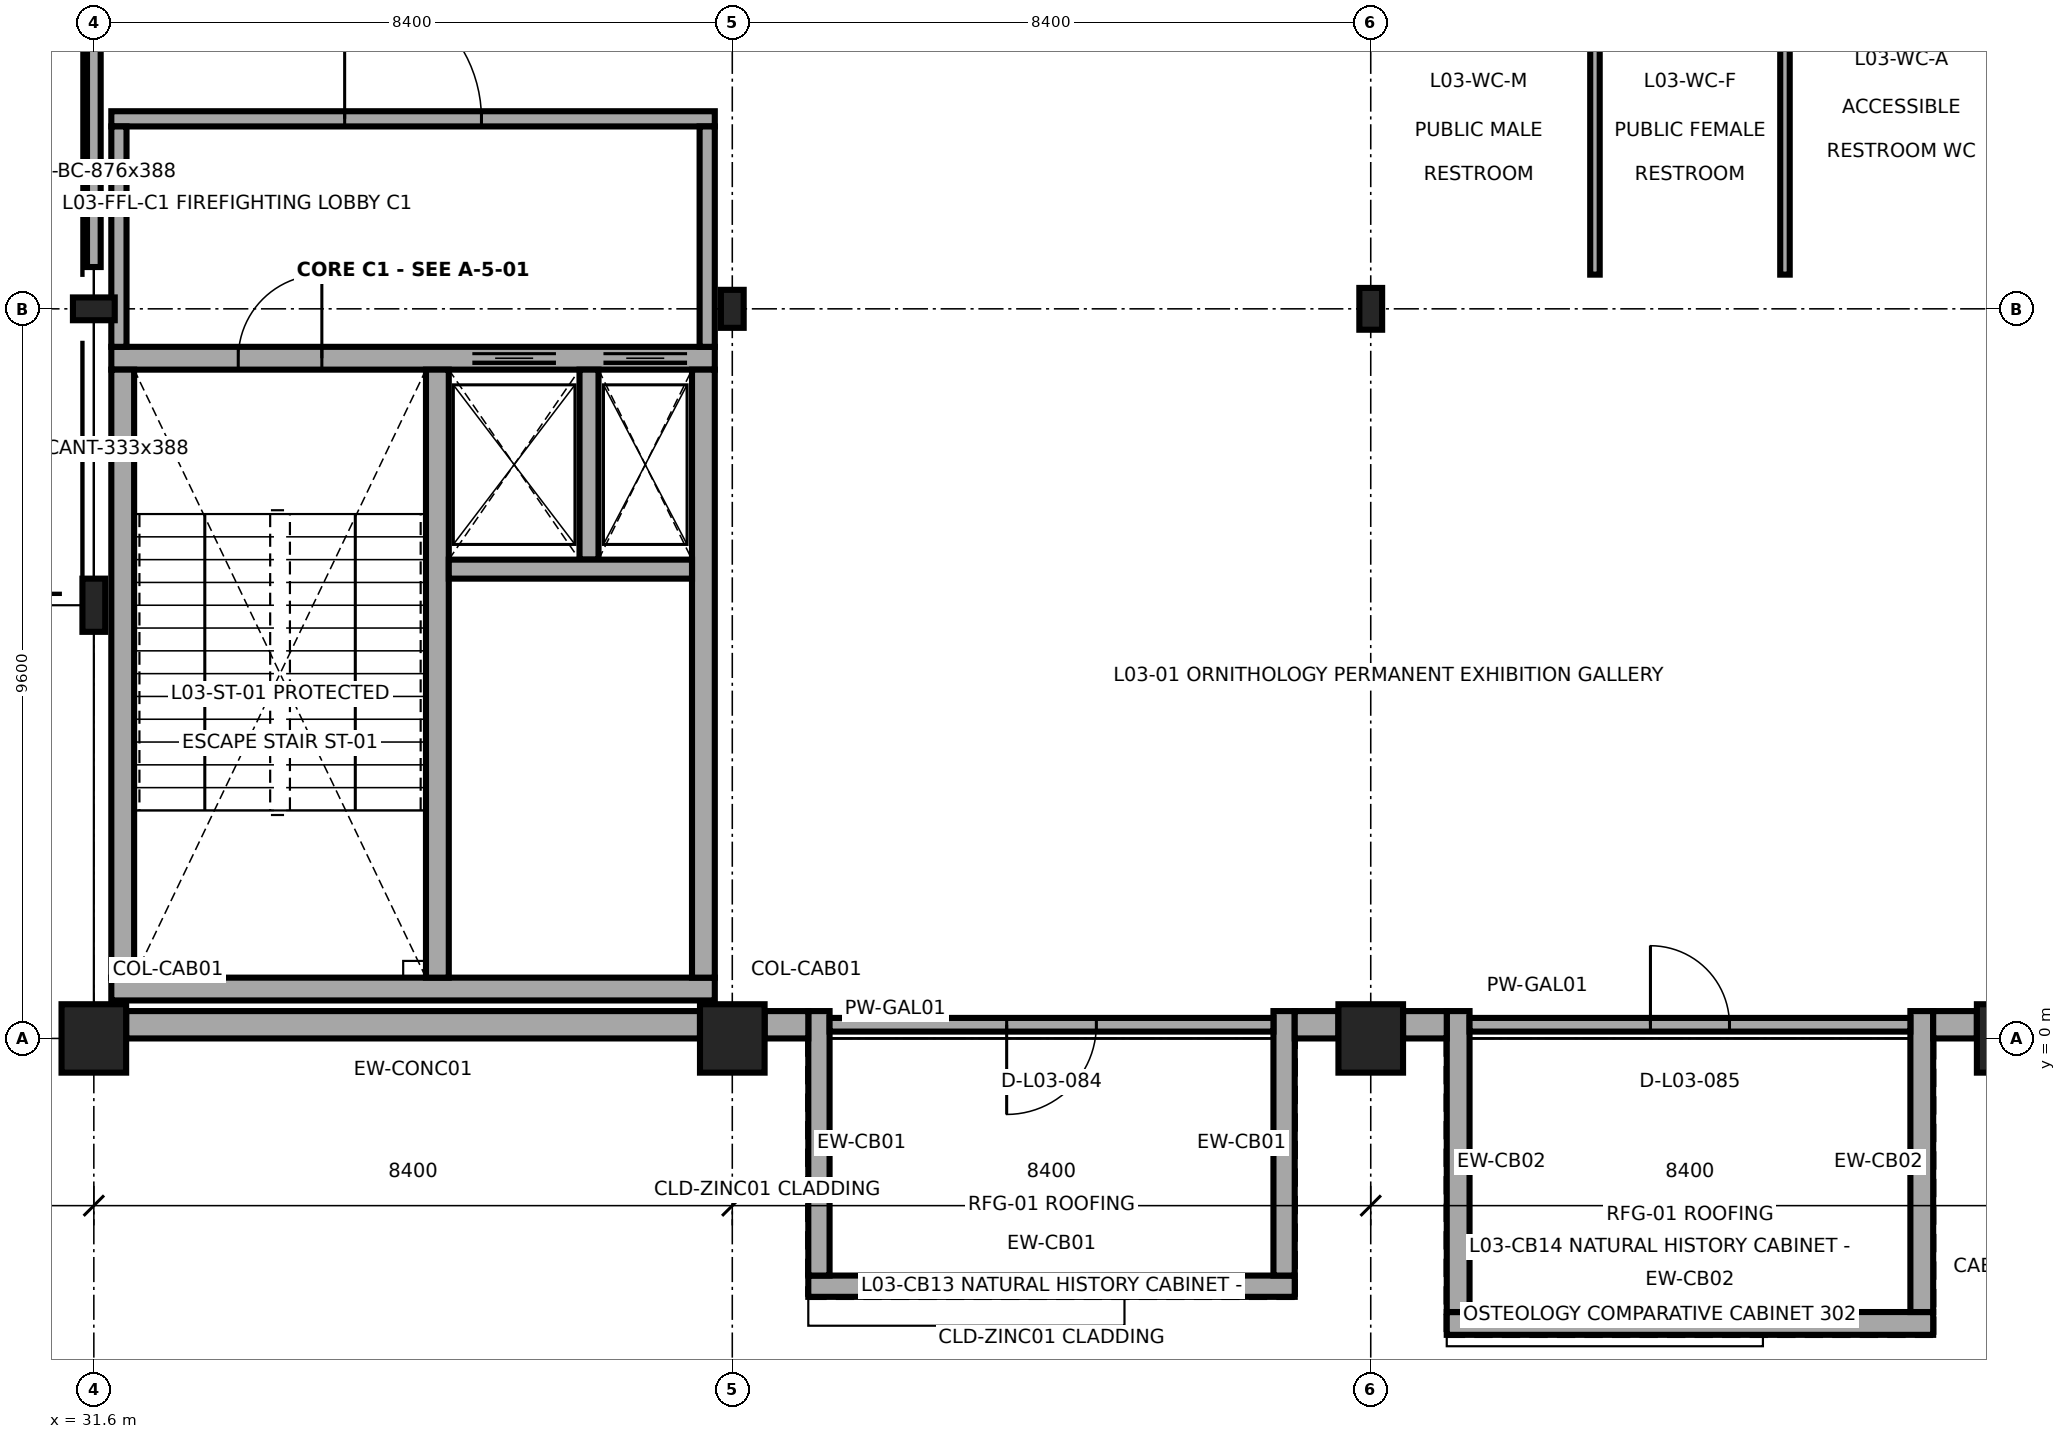
"""IFC4 building model, lengths in metres.
Left out: names, types, materials, properties, quantities, classifications, styles, units other than length and angle.
Written with IfcOpenShell. Run it as: python <this file> out.ifc"""

import sys

from ifc_helpers import new_model, si_unit, direction, frame, frame_2d, origin, origin_2d, place, context, subcontext, project, spatial, rectangle, i_section, extrude, element, fill, save


model = new_model("IFC4")
c1 = context("Model", 3, precision=1e-05, world=origin(), true_north=direction((0.0, 1.0)))
c2 = subcontext(c1, "Body", "Model", "MODEL_VIEW")
j1 = project(units=[si_unit("LENGTHUNIT", "METRE"), si_unit("PLANEANGLEUNIT", "RADIAN")], contexts=[c1])
p1 = place(None, origin())
s1 = spatial("IfcSite", under=j1, at=p1, CompositionType="ELEMENT")
p2 = place(p1, origin())
s2 = spatial("IfcBuilding", under=s1, at=p2, CompositionType="ELEMENT")
p3 = place(p2, frame((0.0, 0.0, 17.4)))
s3 = spatial("IfcBuildingStorey", under=s2, at=p3, CompositionType="ELEMENT", Elevation=17.4)
p4 = place(p3, frame((31.6, 0.0, 0.0), z_axis=(0.0, 0.0, 1.0), x_axis=(1.0, 0.0, 0.0)))
e1 = element("IfcColumn", 1, at=p4, inside=s3, PredefinedType="COLUMN", context=c2, shape_type="SweptSolid", body=[
    extrude(rectangle(XDim=0.85, YDim=0.9, at=origin_2d()), origin(), (0.0, 0.0, 1.0), 4.5),
])
p5 = place(p3, frame((31.6, 9.6, 0.0), z_axis=(0.0, 0.0, 1.0), x_axis=(0.0, 1.0, 0.0)))
e2 = element("IfcColumn", 2, at=p5, inside=s3, PredefinedType="COLUMN", context=c2, shape_type="SweptSolid", body=[
    extrude(i_section(OverallWidth=0.3, OverallDepth=0.55, WebThickness=0.015, FlangeThickness=0.029, FilletRadius=0.027, at=origin_2d()), origin(), (0.0, 0.0, 1.0), 4.5),
])
p6 = place(p3, frame((40.0, 0.0, 0.0), z_axis=(0.0, 0.0, 1.0), x_axis=(1.0, 0.0, 0.0)))
e3 = element("IfcColumn", 3, at=p6, inside=s3, PredefinedType="COLUMN", context=c2, shape_type="SweptSolid", body=[
    extrude(rectangle(XDim=0.85, YDim=0.9, at=origin_2d()), origin(), (0.0, 0.0, 1.0), 4.5),
])
p7 = place(p3, frame((40.0, 9.6, 0.0), z_axis=(0.0, 0.0, 1.0), x_axis=(1.0, 0.0, 0.0)))
e4 = element("IfcColumn", 4, at=p7, inside=s3, PredefinedType="COLUMN", context=c2, shape_type="SweptSolid", body=[
    extrude(i_section(OverallWidth=0.3, OverallDepth=0.5, WebThickness=0.014, FlangeThickness=0.028, FilletRadius=0.027, at=origin_2d()), origin(), (0.0, 0.0, 1.0), 4.5),
])
p8 = place(p3, frame((48.4, 0.0, 0.0), z_axis=(0.0, 0.0, 1.0), x_axis=(1.0, 0.0, 0.0)))
e5 = element("IfcColumn", 5, at=p8, inside=s3, PredefinedType="COLUMN", context=c2, shape_type="SweptSolid", body=[
    extrude(rectangle(XDim=0.85, YDim=0.9, at=origin_2d()), origin(), (0.0, 0.0, 1.0), 4.5),
])
p9 = place(p3, frame((48.4, 9.6, 0.0), z_axis=(0.0, 0.0, 1.0), x_axis=(1.0, 0.0, 0.0)))
e6 = element("IfcColumn", 6, at=p9, inside=s3, PredefinedType="COLUMN", context=c2, shape_type="SweptSolid", body=[
    extrude(i_section(OverallWidth=0.3, OverallDepth=0.55, WebThickness=0.015, FlangeThickness=0.029, FilletRadius=0.027, at=origin_2d()), origin(), (0.0, 0.0, 1.0), 4.5),
])
p10 = place(p3, frame((56.8, 0.0, 0.0), z_axis=(0.0, 0.0, 1.0), x_axis=(1.0, 0.0, 0.0)))
e7 = element("IfcColumn", 7, at=p10, inside=s3, PredefinedType="COLUMN", context=c2, shape_type="SweptSolid", body=[
    extrude(rectangle(XDim=0.85, YDim=0.9, at=origin_2d()), origin(), (0.0, 0.0, 1.0), 4.5),
])
p11 = place(p3, frame((31.6, 5.7, 0.0), z_axis=(0.0, 0.0, 1.0), x_axis=(1.0, 0.0, 0.0)))
e8 = element("IfcColumn", 8, at=p11, inside=s3, PredefinedType="COLUMN", context=c2, shape_type="SweptSolid", body=[
    extrude(i_section(OverallWidth=0.3, OverallDepth=0.7, WebThickness=0.017, FlangeThickness=0.032, FilletRadius=0.027, at=origin_2d()), origin(), (0.0, 0.0, 1.0), 4.5),
])
p12 = place(p3, frame((41.0, -3.26, 0.0), z_axis=(0.0, 0.0, 1.0), x_axis=(1.0, 0.0, 0.0)))
e9 = element("IfcWall", 9, at=p12, inside=s3, PredefinedType="SOLIDWALL", context=c2, shape_type="SweptSolid", body=[
    extrude(rectangle(XDim=6.4, YDim=0.28, at=frame_2d((3.2, 0.0))), origin(), (0.0, 0.0, 1.0), 2.99),
])
for number, where, z_axis, x_axis in (
    (10, (41.14, 0.36, 0.0), (0.0, 0.0, 1.0), (0.0, -1.0, 0.0)),
    (11, (47.26, -3.12, 0.0), (0.0, 0.0, 1.0), (0.0, 1.0, 0.0)),
):
    element("IfcWall", number, at=place(p3, frame(where, z_axis=z_axis, x_axis=x_axis)), inside=s3, PredefinedType="SOLIDWALL", context=c2, shape_type="SweptSolid", body=[
        extrude(rectangle(XDim=3.48, YDim=0.28, at=frame_2d((1.74, 0.0))), origin(), (0.0, 0.0, 1.0), 2.99),
    ])
p13 = place(p3, frame((49.4, -3.75, 0.0), z_axis=(0.0, 0.0, 1.0), x_axis=(1.0, 0.0, 0.0)))
e12 = element("IfcWall", 12, at=p13, inside=s3, PredefinedType="SOLIDWALL", context=c2, shape_type="SweptSolid", body=[
    extrude(rectangle(XDim=6.4, YDim=0.3, at=frame_2d((3.2, 0.0))), origin(), (0.0, 0.0, 1.0), 2.99),
])
for number, where, z_axis, x_axis in (
    (13, (49.55, 0.36, 0.0), (0.0, 0.0, 1.0), (0.0, -1.0, 0.0)),
    (14, (55.65, -3.6, 0.0), (0.0, 0.0, 1.0), (0.0, 1.0, 0.0)),
):
    element("IfcWall", number, at=place(p3, frame(where, z_axis=z_axis, x_axis=x_axis)), inside=s3, PredefinedType="SOLIDWALL", context=c2, shape_type="SweptSolid", body=[
        extrude(rectangle(XDim=3.96, YDim=0.3, at=frame_2d((1.98, 0.0))), origin(), (0.0, 0.0, 1.0), 2.99),
    ])
p14 = place(p3, frame((32.025, 0.18, 0.0), z_axis=(0.0, 0.0, 1.0), x_axis=(1.0, 0.0, 0.0)))
e15 = element("IfcWall", 15, at=p14, inside=s3, PredefinedType="SOLIDWALL", context=c2, shape_type="SweptSolid", body=[
    extrude(rectangle(XDim=7.55, YDim=0.36, at=frame_2d((3.775, 0.0))), origin(), (0.0, 0.0, 1.0), 3.335),
])
p15 = place(p3, frame((40.425, 0.18, 0.0), z_axis=(0.0, 0.0, 1.0), x_axis=(1.0, 0.0, 0.0)))
e16 = element("IfcWall", 16, at=p15, inside=s3, PredefinedType="SOLIDWALL", context=c2, shape_type="SweptSolid", body=[
    extrude(rectangle(XDim=0.575, YDim=0.36, at=frame_2d((0.288, 0.0))), origin(), (0.0, 0.0, 1.0), 3.335),
])
p16 = place(p3, frame((47.4, 0.18, 0.0), z_axis=(0.0, 0.0, 1.0), x_axis=(1.0, 0.0, 0.0)))
e17 = element("IfcWall", 17, at=p16, inside=s3, PredefinedType="SOLIDWALL", context=c2, shape_type="SweptSolid", body=[
    extrude(rectangle(XDim=0.575, YDim=0.36, at=frame_2d((0.288, 0.0))), origin(), (0.0, 0.0, 1.0), 3.335),
])
for number, where, z_axis, x_axis in (
    (18, (48.825, 0.18, 0.0), (0.0, 0.0, 1.0), (1.0, 0.0, 0.0)),
    (19, (55.8, 0.18, 0.0), (0.0, 0.0, 1.0), (1.0, 0.0, 0.0)),
):
    element("IfcWall", number, at=place(p3, frame(where, z_axis=z_axis, x_axis=x_axis)), inside=s3, PredefinedType="SOLIDWALL", context=c2, shape_type="SweptSolid", body=[
        extrude(rectangle(XDim=0.575, YDim=0.36, at=frame_2d((0.288, 0.0))), origin(), (0.0, 0.0, 1.0), 3.335),
    ])
p17 = place(p3, frame((31.83, 0.65, 0.0), z_axis=(0.0, 0.0, 1.0), x_axis=(1.0, 0.0, 0.0)))
e20 = element("IfcWall", 20, at=p17, inside=s3, PredefinedType="SHEAR", context=c2, shape_type="SweptSolid", body=[
    extrude(rectangle(XDim=7.94, YDim=0.3, at=frame_2d((3.97, 0.0))), origin(), (0.0, 0.0, 1.0), 4.25),
])
p18 = place(p3, frame((39.77, 8.95, 0.0), z_axis=(0.0, 0.0, 1.0), x_axis=(-1.0, 0.0, 0.0)))
e21 = element("IfcWall", 21, at=p18, inside=s3, PredefinedType="SHEAR", context=c2, shape_type="SweptSolid", body=[
    extrude(rectangle(XDim=7.94, YDim=0.3, at=frame_2d((3.97, 0.0))), origin(), (0.0, 0.0, 1.0), 4.25),
])
p19 = place(p18, frame((5.17, 0.0, 0.0)))
e22 = element("IfcOpeningElement", 22, at=p19, cuts=e21, PredefinedType="OPENING", context=c2, shape_type="SweptSolid", body=[
    extrude(rectangle(XDim=1.1, YDim=2.2, at=frame_2d((0.55, 1.1))), frame((0.0, 0.16, 0.0), z_axis=(0.0, -1.0, 0.0), x_axis=(1.0, 0.0, 0.0)), (0.0, 0.0, 1.0), 0.32),
])
p20 = place(p18, frame((2.09, 0.0, 0.0)))
e23 = element("IfcOpeningElement", 23, at=p20, cuts=e21, PredefinedType="OPENING", context=c2, shape_type="SweptSolid", body=[
    extrude(rectangle(XDim=1.1, YDim=2.1, at=frame_2d((0.55, 1.05))), frame((0.0, 0.16, 0.0), z_axis=(0.0, -1.0, 0.0), x_axis=(1.0, 0.0, 0.0)), (0.0, 0.0, 1.0), 0.32),
])
p21 = place(p18, frame((0.365, 0.0, 0.0)))
e24 = element("IfcOpeningElement", 24, at=p21, cuts=e21, PredefinedType="OPENING", context=c2, shape_type="SweptSolid", body=[
    extrude(rectangle(XDim=1.1, YDim=2.1, at=frame_2d((0.55, 1.05))), frame((0.0, 0.16, 0.0), z_axis=(0.0, -1.0, 0.0), x_axis=(1.0, 0.0, 0.0)), (0.0, 0.0, 1.0), 0.32),
])
for number, where, z_axis, x_axis in (
    (25, (31.98, 8.8, 0.0), (0.0, 0.0, 1.0), (0.0, -1.0, 0.0)),
    (26, (39.62, 0.8, 0.0), (0.0, 0.0, 1.0), (0.0, 1.0, 0.0)),
    (27, (36.12, 0.8, 0.0), (0.0, 0.0, 1.0), (0.0, 1.0, 0.0)),
):
    element("IfcWall", number, at=place(p3, frame(where, z_axis=z_axis, x_axis=x_axis)), inside=s3, PredefinedType="SHEAR", context=c2, shape_type="SweptSolid", body=[
        extrude(rectangle(XDim=8.0, YDim=0.3, at=frame_2d((4.0, 0.0))), origin(), (0.0, 0.0, 1.0), 4.25),
    ])
p22 = place(p3, frame((38.115, 6.3, 0.0), z_axis=(0.0, 0.0, 1.0), x_axis=(0.0, 1.0, 0.0)))
e28 = element("IfcWall", 28, at=p22, inside=s3, PredefinedType="SHEAR", context=c2, shape_type="SweptSolid", body=[
    extrude(rectangle(XDim=2.5, YDim=0.25, at=frame_2d((1.25, 0.0))), origin(), (0.0, 0.0, 1.0), 4.25),
])
p23 = place(p3, frame((36.27, 6.175, 0.0), z_axis=(0.0, 0.0, 1.0), x_axis=(1.0, 0.0, 0.0)))
e29 = element("IfcWall", 29, at=p23, inside=s3, PredefinedType="SHEAR", context=c2, shape_type="SweptSolid", body=[
    extrude(rectangle(XDim=3.2, YDim=0.25, at=frame_2d((1.6, 0.0))), origin(), (0.0, 0.0, 1.0), 4.25),
])
p24 = place(p3, frame((31.83, 12.1, 0.0), z_axis=(0.0, 0.0, 1.0), x_axis=(1.0, 0.0, 0.0)))
e30 = element("IfcWall", 30, at=p24, inside=s3, PredefinedType="SOLIDWALL", context=c2, shape_type="SweptSolid", body=[
    extrude(rectangle(XDim=7.94, YDim=0.2, at=frame_2d((3.97, 0.0))), origin(), (0.0, 0.0, 1.0), 3.532),
])
p25 = place(p24, frame((3.07, 0.0, 0.0)))
e31 = element("IfcOpeningElement", 31, at=p25, cuts=e30, PredefinedType="OPENING", context=c2, shape_type="SweptSolid", body=[
    extrude(rectangle(XDim=1.8, YDim=2.2, at=frame_2d((0.9, 1.1))), frame((0.0, 0.11, 0.0), z_axis=(0.0, -1.0, 0.0), x_axis=(1.0, 0.0, 0.0)), (0.0, 0.0, 1.0), 0.22),
])
for number, where, z_axis, x_axis in (
    (32, (31.93, 9.1, 0.0), (0.0, 0.0, 1.0), (0.0, 1.0, 0.0)),
    (33, (39.67, 12.0, 0.0), (0.0, 0.0, 1.0), (0.0, -1.0, 0.0)),
):
    element("IfcWall", number, at=place(p3, frame(where, z_axis=z_axis, x_axis=x_axis)), inside=s3, PredefinedType="SOLIDWALL", context=c2, shape_type="SweptSolid", body=[
        extrude(rectangle(XDim=2.9, YDim=0.2, at=frame_2d((1.45, 0.0))), origin(), (0.0, 0.0, 1.0), 3.732),
    ])
p26 = place(p3, frame((41.28, 0.18, 0.0), z_axis=(0.0, 0.0, 1.0), x_axis=(1.0, 0.0, 0.0)))
e34 = element("IfcWall", 34, at=p26, inside=s3, PredefinedType="PARTITIONING", context=c2, shape_type="SweptSolid", body=[
    extrude(rectangle(XDim=5.84, YDim=0.18, at=frame_2d((2.92, 0.0))), origin(), (0.0, 0.0, 1.0), 2.99),
])
p27 = place(p26, frame((2.33, 0.0, 0.0)))
e35 = element("IfcOpeningElement", 35, at=p27, cuts=e34, PredefinedType="OPENING", context=c2, shape_type="SweptSolid", body=[
    extrude(rectangle(XDim=1.18, YDim=2.25, at=frame_2d((0.59, 1.125))), frame((0.0, 0.1, 0.0), z_axis=(0.0, -1.0, 0.0), x_axis=(1.0, 0.0, 0.0)), (0.0, 0.0, 1.0), 0.2),
])
p28 = place(p3, frame((49.7, 0.18, 0.0), z_axis=(0.0, 0.0, 1.0), x_axis=(1.0, 0.0, 0.0)))
e36 = element("IfcWall", 36, at=p28, inside=s3, PredefinedType="PARTITIONING", context=c2, shape_type="SweptSolid", body=[
    extrude(rectangle(XDim=5.8, YDim=0.18, at=frame_2d((2.9, 0.0))), origin(), (0.0, 0.0, 1.0), 2.99),
])
p29 = place(p28, frame((2.38, 0.0, 0.0)))
e37 = element("IfcOpeningElement", 37, at=p29, cuts=e36, PredefinedType="OPENING", context=c2, shape_type="SweptSolid", body=[
    extrude(rectangle(XDim=1.04, YDim=2.18, at=frame_2d((0.52, 1.09))), frame((0.0, 0.1, 0.0), z_axis=(0.0, -1.0, 0.0), x_axis=(1.0, 0.0, 0.0)), (0.0, 0.0, 1.0), 0.2),
])
for number, where, z_axis, x_axis in (
    (38, (51.35, 10.05, 0.0), (0.0, 0.0, 1.0), (0.0, 1.0, 0.0)),
    (39, (53.85, 10.05, 0.0), (0.0, 0.0, 1.0), (0.0, 1.0, 0.0)),
):
    element("IfcWall", number, at=place(p3, frame(where, z_axis=z_axis, x_axis=x_axis)), inside=s3, PredefinedType="PARTITIONING", context=c2, shape_type="SweptSolid", body=[
        extrude(rectangle(XDim=6.27, YDim=0.125, at=frame_2d((3.135, 0.0))), origin(), (0.0, 0.0, 1.0), 4.23),
    ])
p30 = place(p3, frame((31.6, 10.15, 0.0), z_axis=(0.0, 0.0, 1.0), x_axis=(0.0, 1.0, 0.0)))
e40 = element("IfcWall", 40, at=p30, inside=s3, PredefinedType="PARTITIONING", context=c2, shape_type="SweptSolid", body=[
    extrude(rectangle(XDim=8.5, YDim=0.18, at=frame_2d((4.25, 0.0))), origin(), (0.0, 0.0, 1.0), 3.532),
])
p31 = place(p30, frame((3.15, 0.0, 0.0)))
e41 = element("IfcOpeningElement", 41, at=p31, cuts=e40, PredefinedType="OPENING", context=c2, shape_type="SweptSolid", body=[
    extrude(rectangle(XDim=2.2, YDim=2.6, at=frame_2d((1.1, 1.3))), frame((0.0, 0.1, 0.0), z_axis=(0.0, -1.0, 0.0), x_axis=(1.0, 0.0, 0.0)), (0.0, 0.0, 1.0), 0.2),
])
p32 = place(p19, origin())
e42 = element("IfcDoor", 42, at=p32, inside=s3, OperationType="SINGLE_SWING_RIGHT", PredefinedType="DOOR", context=c2, shape_type="SweptSolid", body=[
    extrude(rectangle(XDim=1.1, YDim=2.2, at=frame_2d((0.55, 1.1))), frame((0.0, 0.025, 0.0), z_axis=(0.0, -1.0, 0.0), x_axis=(1.0, 0.0, 0.0)), (0.0, 0.0, 1.0), 0.05),
])
fill(e22, e42)
p33 = place(p20, origin())
e43 = element("IfcDoor", 43, at=p33, inside=s3, OperationType="SLIDING_TO_LEFT", PredefinedType="DOOR", context=c2, shape_type="SweptSolid", body=[
    extrude(rectangle(XDim=1.1, YDim=2.1, at=frame_2d((0.55, 1.05))), frame((0.0, 0.025, 0.0), z_axis=(0.0, -1.0, 0.0), x_axis=(1.0, 0.0, 0.0)), (0.0, 0.0, 1.0), 0.05),
])
fill(e23, e43)
p34 = place(p21, origin())
e44 = element("IfcDoor", 44, at=p34, inside=s3, OperationType="SLIDING_TO_LEFT", PredefinedType="DOOR", context=c2, shape_type="SweptSolid", body=[
    extrude(rectangle(XDim=1.1, YDim=2.1, at=frame_2d((0.55, 1.05))), frame((0.0, 0.025, 0.0), z_axis=(0.0, -1.0, 0.0), x_axis=(1.0, 0.0, 0.0)), (0.0, 0.0, 1.0), 0.05),
])
fill(e24, e44)
p35 = place(p25, origin())
e45 = element("IfcDoor", 45, at=p35, inside=s3, OperationType="DOUBLE_DOOR_SINGLE_SWING", PredefinedType="DOOR", context=c2, shape_type="SweptSolid", body=[
    extrude(rectangle(XDim=1.8, YDim=2.2, at=frame_2d((0.9, 1.1))), frame((0.0, 0.025, 0.0), z_axis=(0.0, -1.0, 0.0), x_axis=(1.0, 0.0, 0.0)), (0.0, 0.0, 1.0), 0.05),
])
fill(e31, e45)
p36 = place(p27, origin())
e46 = element("IfcDoor", 46, at=p36, inside=s3, OperationType="SINGLE_SWING_RIGHT", PredefinedType="DOOR", context=c2, shape_type="SweptSolid", body=[
    extrude(rectangle(XDim=1.18, YDim=2.25, at=frame_2d((0.59, 1.125))), frame((0.0, 0.025, 0.0), z_axis=(0.0, -1.0, 0.0), x_axis=(1.0, 0.0, 0.0)), (0.0, 0.0, 1.0), 0.05),
])
fill(e35, e46)
p37 = place(p29, origin())
e47 = element("IfcDoor", 47, at=p37, inside=s3, OperationType="SINGLE_SWING_LEFT", PredefinedType="DOOR", context=c2, shape_type="SweptSolid", body=[
    extrude(rectangle(XDim=1.04, YDim=2.18, at=frame_2d((0.52, 1.09))), frame((0.0, 0.025, 0.0), z_axis=(0.0, -1.0, 0.0), x_axis=(1.0, 0.0, 0.0)), (0.0, 0.0, 1.0), 0.05),
])
fill(e37, e47)
save(model, sys.argv[1])
